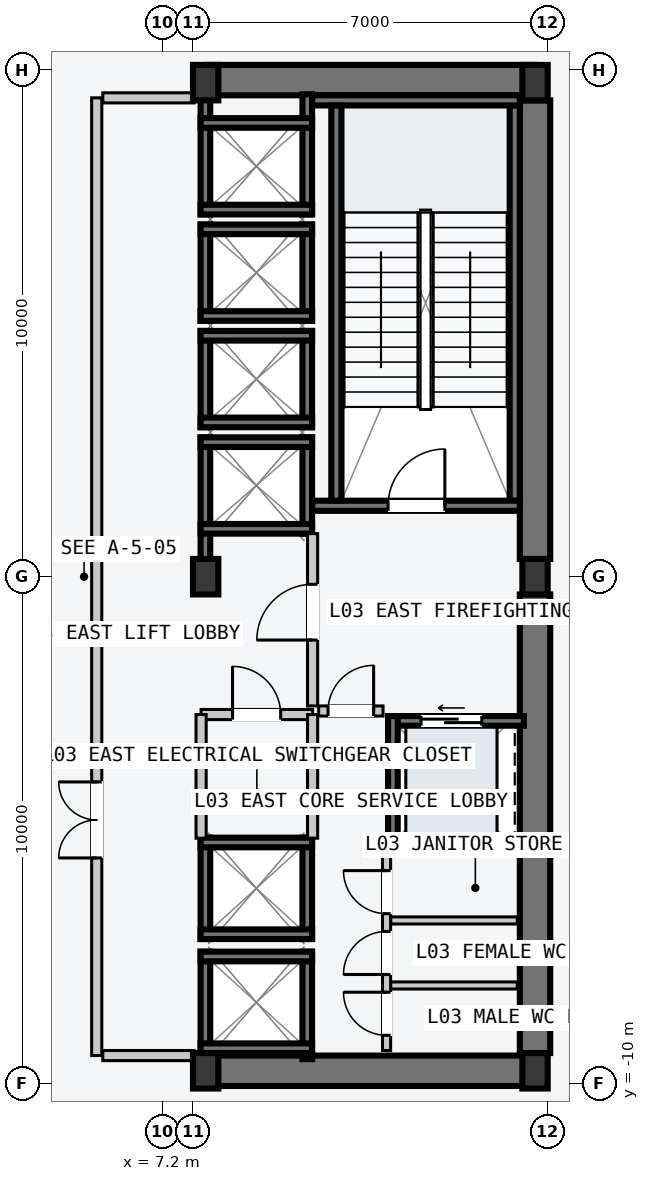
"""IFC4 building model, lengths in metres.
Left out: names, types, materials, properties, quantities, classifications, styles, units other than length and angle.
Written with IfcOpenShell. Run it as: python <this file> out.ifc"""

import sys

from ifc_helpers import new_model, si_unit, direction, frame, frame_2d, origin, origin_2d, place, context, subcontext, project, spatial, rectangle, i_section, extrude, element, fill, save


model = new_model("IFC4")
c1 = context("Model", 3, precision=1e-05, world=origin(), true_north=direction((0.0, 1.0)))
c2 = subcontext(c1, "Body", "Model", "MODEL_VIEW")
j1 = project(units=[si_unit("LENGTHUNIT", "METRE"), si_unit("PLANEANGLEUNIT", "RADIAN")], contexts=[c1])
p1 = place(None, origin())
s1 = spatial("IfcSite", under=j1, at=p1, CompositionType="ELEMENT")
p2 = place(p1, origin())
s2 = spatial("IfcBuilding", under=s1, at=p2, CompositionType="ELEMENT")
p3 = place(p2, frame((0.0, 0.0, 14.4)))
s3 = spatial("IfcBuildingStorey", under=s2, at=p3, CompositionType="ELEMENT", Elevation=14.4)
for number, where, z_axis, x_axis in (
    (1, (8.07, -9.75, -0.22), (0.0, 0.0, 1.0), (1.0, 0.0, 0.0)),
    (2, (8.07, 9.8, -0.22), (0.0, 0.0, 1.0), (1.0, 0.0, 0.0)),
):
    element("IfcWall", number, at=place(p3, frame(where, z_axis=z_axis, x_axis=x_axis)), inside=s3, PredefinedType="SHEAR", context=c2, shape_type="SweptSolid", body=[
        extrude(rectangle(XDim=6.46, YDim=0.6, at=frame_2d((3.23, 0.0))), origin(), (0.0, 0.0, 1.0), 4.8),
    ])
for number, where, z_axis, x_axis in (
    (3, (14.55, -9.4, -0.22), (0.0, 0.0, 1.0), (0.0, 1.0, 0.0)),
    (4, (14.55, 0.35, -0.22), (0.0, 0.0, 1.0), (0.0, 1.0, 0.0)),
):
    element("IfcWall", number, at=place(p3, frame(where, z_axis=z_axis, x_axis=x_axis)), inside=s3, PredefinedType="SHEAR", context=c2, shape_type="SweptSolid", body=[
        extrude(rectangle(XDim=9.05, YDim=0.6, at=frame_2d((4.525, 0.0))), origin(), (0.0, 0.0, 1.0), 4.8),
    ])
p4 = place(p3, frame((14.15, 1.5, -0.22), z_axis=(0.0, 0.0, 1.0), x_axis=(0.0, 1.0, 0.0)))
e5 = element("IfcWall", 5, at=p4, inside=s3, PredefinedType="SOLIDWALL", context=c2, shape_type="SweptSolid", body=[
    extrude(rectangle(XDim=7.8, YDim=0.2, at=frame_2d((3.9, 0.0))), origin(), (0.0, 0.0, 1.0), 4.8),
])
p5 = place(p3, frame((10.15, 1.4, -0.22), z_axis=(0.0, 0.0, 1.0), x_axis=(1.0, 0.0, 0.0)))
e6 = element("IfcWall", 6, at=p5, inside=s3, PredefinedType="SOLIDWALL", context=c2, shape_type="SweptSolid", body=[
    extrude(rectangle(XDim=4.1, YDim=0.2, at=frame_2d((2.05, 0.0))), origin(), (0.0, 0.0, 1.0), 4.8),
])
p6 = place(p5, frame((1.5, 0.0, 0.22)))
e7 = element("IfcOpeningElement", 7, at=p6, cuts=e6, PredefinedType="OPENING", context=c2, shape_type="SweptSolid", body=[
    extrude(rectangle(XDim=1.12, YDim=2.18, at=frame_2d((0.56, 1.09))), frame((0.0, 0.11, 0.0), z_axis=(0.0, -1.0, 0.0), x_axis=(1.0, 0.0, 0.0)), (0.0, 0.0, 1.0), 0.22),
])
p7 = place(p3, frame((10.15, 9.4, -0.22), z_axis=(0.0, 0.0, 1.0), x_axis=(1.0, 0.0, 0.0)))
e8 = element("IfcWall", 8, at=p7, inside=s3, PredefinedType="SOLIDWALL", context=c2, shape_type="SweptSolid", body=[
    extrude(rectangle(XDim=4.1, YDim=0.2, at=frame_2d((2.05, 0.0))), origin(), (0.0, 0.0, 1.0), 4.8),
])
p8 = place(p3, frame((10.63, 1.5, -0.22), z_axis=(0.0, 0.0, 1.0), x_axis=(0.0, 1.0, 0.0)))
e9 = element("IfcWall", 9, at=p8, inside=s3, PredefinedType="SOLIDWALL", context=c2, shape_type="SweptSolid", body=[
    extrude(rectangle(XDim=7.8, YDim=0.2, at=frame_2d((3.9, 0.0))), origin(), (0.0, 0.0, 1.0), 4.8),
])
for number, where, z_axis, x_axis in (
    (10, (8.05, -9.75, 0.0), (0.0, 0.0, 1.0), (1.0, 0.0, 0.0)),
    (11, (8.05, 0.0, 0.0), (0.0, 0.0, 1.0), (1.0, 0.0, 0.0)),
    (12, (8.05, 9.75, 0.0), (0.0, 0.0, 1.0), (1.0, 0.0, 0.0)),
    (13, (14.55, -9.75, 0.0), (0.0, 0.0, 1.0), (1.0, 0.0, 0.0)),
    (14, (14.55, 0.0, 0.0), (0.0, 0.0, 1.0), (1.0, 0.0, 0.0)),
    (15, (14.55, 9.75, 0.0), (0.0, 0.0, 1.0), (1.0, 0.0, 0.0)),
):
    element("IfcColumn", number, at=place(p3, frame(where, z_axis=z_axis, x_axis=x_axis)), inside=s3, PredefinedType="COLUMN", context=c2, shape_type="SweptSolid", body=[
        extrude(i_section(OverallWidth=0.5, OverallDepth=0.7, WebThickness=0.028, FlangeThickness=0.045, at=origin_2d()), origin(), (0.0, 0.0, 1.0), 4.8),
    ])
p9 = place(p3, frame((8.045, 0.21, -0.22), z_axis=(0.0, 0.0, 1.0), x_axis=(0.0, 1.0, 0.0)))
e16 = element("IfcWall", 16, at=p9, inside=s3, PredefinedType="SOLIDWALL", context=c2, shape_type="SweptSolid", body=[
    extrude(rectangle(XDim=2.54, YDim=0.19, at=frame_2d((1.27, 0.0))), origin(), (0.0, 0.0, 1.0), 4.8),
])
p10 = place(p3, frame((10.055, 0.85, -0.22), z_axis=(0.0, 0.0, 1.0), x_axis=(0.0, 1.0, 0.0)))
e17 = element("IfcWall", 17, at=p10, inside=s3, PredefinedType="SOLIDWALL", context=c2, shape_type="SweptSolid", body=[
    extrude(rectangle(XDim=1.9, YDim=0.19, at=frame_2d((0.95, 0.0))), origin(), (0.0, 0.0, 1.0), 4.8),
])
for number, where, z_axis, x_axis in (
    (18, (7.95, 2.655, -0.22), (0.0, 0.0, 1.0), (1.0, 0.0, 0.0)),
    (19, (7.95, 0.945, -0.22), (0.0, 0.0, 1.0), (1.0, 0.0, 0.0)),
):
    element("IfcWall", number, at=place(p3, frame(where, z_axis=z_axis, x_axis=x_axis)), inside=s3, PredefinedType="SOLIDWALL", context=c2, shape_type="SweptSolid", body=[
        extrude(rectangle(XDim=2.2, YDim=0.19, at=frame_2d((1.1, 0.0))), origin(), (0.0, 0.0, 1.0), 4.8),
    ])
for number, where, z_axis, x_axis in (
    (20, (8.045, 2.95, -0.22), (0.0, 0.0, 1.0), (0.0, 1.0, 0.0)),
    (21, (10.055, 2.95, -0.22), (0.0, 0.0, 1.0), (0.0, 1.0, 0.0)),
):
    element("IfcWall", number, at=place(p3, frame(where, z_axis=z_axis, x_axis=x_axis)), inside=s3, PredefinedType="SOLIDWALL", context=c2, shape_type="SweptSolid", body=[
        extrude(rectangle(XDim=1.9, YDim=0.19, at=frame_2d((0.95, 0.0))), origin(), (0.0, 0.0, 1.0), 4.8),
    ])
for number, where, z_axis, x_axis in (
    (22, (7.95, 4.755, -0.22), (0.0, 0.0, 1.0), (1.0, 0.0, 0.0)),
    (23, (7.95, 3.045, -0.22), (0.0, 0.0, 1.0), (1.0, 0.0, 0.0)),
):
    element("IfcWall", number, at=place(p3, frame(where, z_axis=z_axis, x_axis=x_axis)), inside=s3, PredefinedType="SOLIDWALL", context=c2, shape_type="SweptSolid", body=[
        extrude(rectangle(XDim=2.2, YDim=0.19, at=frame_2d((1.1, 0.0))), origin(), (0.0, 0.0, 1.0), 4.8),
    ])
for number, where, z_axis, x_axis in (
    (24, (8.045, 5.05, -0.22), (0.0, 0.0, 1.0), (0.0, 1.0, 0.0)),
    (25, (10.055, 5.05, -0.22), (0.0, 0.0, 1.0), (0.0, 1.0, 0.0)),
):
    element("IfcWall", number, at=place(p3, frame(where, z_axis=z_axis, x_axis=x_axis)), inside=s3, PredefinedType="SOLIDWALL", context=c2, shape_type="SweptSolid", body=[
        extrude(rectangle(XDim=1.9, YDim=0.19, at=frame_2d((0.95, 0.0))), origin(), (0.0, 0.0, 1.0), 4.8),
    ])
for number, where, z_axis, x_axis in (
    (26, (7.95, 6.855, -0.22), (0.0, 0.0, 1.0), (1.0, 0.0, 0.0)),
    (27, (7.95, 5.145, -0.22), (0.0, 0.0, 1.0), (1.0, 0.0, 0.0)),
):
    element("IfcWall", number, at=place(p3, frame(where, z_axis=z_axis, x_axis=x_axis)), inside=s3, PredefinedType="SOLIDWALL", context=c2, shape_type="SweptSolid", body=[
        extrude(rectangle(XDim=2.2, YDim=0.19, at=frame_2d((1.1, 0.0))), origin(), (0.0, 0.0, 1.0), 4.8),
    ])
for number, where, z_axis, x_axis in (
    (28, (8.045, 7.15, -0.22), (0.0, 0.0, 1.0), (0.0, 1.0, 0.0)),
    (29, (10.055, 7.15, -0.22), (0.0, 0.0, 1.0), (0.0, 1.0, 0.0)),
):
    element("IfcWall", number, at=place(p3, frame(where, z_axis=z_axis, x_axis=x_axis)), inside=s3, PredefinedType="SOLIDWALL", context=c2, shape_type="SweptSolid", body=[
        extrude(rectangle(XDim=2.37, YDim=0.19, at=frame_2d((1.185, 0.0))), origin(), (0.0, 0.0, 1.0), 4.8),
    ])
for number, where, z_axis, x_axis in (
    (30, (7.95, 8.955, -0.22), (0.0, 0.0, 1.0), (1.0, 0.0, 0.0)),
    (31, (7.95, 7.245, -0.22), (0.0, 0.0, 1.0), (1.0, 0.0, 0.0)),
):
    element("IfcWall", number, at=place(p3, frame(where, z_axis=z_axis, x_axis=x_axis)), inside=s3, PredefinedType="SOLIDWALL", context=c2, shape_type="SweptSolid", body=[
        extrude(rectangle(XDim=2.2, YDim=0.19, at=frame_2d((1.1, 0.0))), origin(), (0.0, 0.0, 1.0), 4.8),
    ])
for number, where, z_axis, x_axis in (
    (32, (8.045, -9.52, -0.22), (0.0, 0.0, 1.0), (0.0, 1.0, 0.0)),
    (33, (10.055, -9.52, -0.22), (0.0, 0.0, 1.0), (0.0, 1.0, 0.0)),
):
    element("IfcWall", number, at=place(p3, frame(where, z_axis=z_axis, x_axis=x_axis)), inside=s3, PredefinedType="SOLIDWALL", context=c2, shape_type="SweptSolid", body=[
        extrude(rectangle(XDim=2.12, YDim=0.19, at=frame_2d((1.06, 0.0))), origin(), (0.0, 0.0, 1.0), 4.8),
    ])
for number, where, z_axis, x_axis in (
    (34, (7.95, -7.495, -0.22), (0.0, 0.0, 1.0), (1.0, 0.0, 0.0)),
    (35, (7.95, -9.305, -0.22), (0.0, 0.0, 1.0), (1.0, 0.0, 0.0)),
):
    element("IfcWall", number, at=place(p3, frame(where, z_axis=z_axis, x_axis=x_axis)), inside=s3, PredefinedType="SOLIDWALL", context=c2, shape_type="SweptSolid", body=[
        extrude(rectangle(XDim=2.2, YDim=0.19, at=frame_2d((1.1, 0.0))), origin(), (0.0, 0.0, 1.0), 4.8),
    ])
for number, where, z_axis, x_axis in (
    (36, (8.045, -7.15, -0.22), (0.0, 0.0, 1.0), (0.0, 1.0, 0.0)),
    (37, (10.055, -7.15, -0.22), (0.0, 0.0, 1.0), (0.0, 1.0, 0.0)),
):
    element("IfcWall", number, at=place(p3, frame(where, z_axis=z_axis, x_axis=x_axis)), inside=s3, PredefinedType="SOLIDWALL", context=c2, shape_type="SweptSolid", body=[
        extrude(rectangle(XDim=2.0, YDim=0.19, at=frame_2d((1.0, 0.0))), origin(), (0.0, 0.0, 1.0), 4.8),
    ])
for number, where, z_axis, x_axis in (
    (38, (7.95, -5.245, -0.22), (0.0, 0.0, 1.0), (1.0, 0.0, 0.0)),
    (39, (7.95, -7.055, -0.22), (0.0, 0.0, 1.0), (1.0, 0.0, 0.0)),
):
    element("IfcWall", number, at=place(p3, frame(where, z_axis=z_axis, x_axis=x_axis)), inside=s3, PredefinedType="SOLIDWALL", context=c2, shape_type="SweptSolid", body=[
        extrude(rectangle(XDim=2.2, YDim=0.19, at=frame_2d((1.1, 0.0))), origin(), (0.0, 0.0, 1.0), 4.8),
    ])
p11 = place(p3, frame((11.65, -2.845, -0.22), z_axis=(0.0, 0.0, 1.0), x_axis=(1.0, 0.0, 0.0)))
e40 = element("IfcWall", 40, at=p11, inside=s3, PredefinedType="SOLIDWALL", context=c2, shape_type="SweptSolid", body=[
    extrude(rectangle(XDim=2.68, YDim=0.19, at=frame_2d((1.34, 0.0))), origin(), (0.0, 0.0, 1.0), 4.8),
])
p12 = place(p11, frame((0.65, 0.0, 0.22)))
e41 = element("IfcOpeningElement", 41, at=p12, cuts=e40, PredefinedType="OPENING", context=c2, shape_type="SweptSolid", body=[
    extrude(rectangle(XDim=1.2, YDim=2.2, at=frame_2d((0.6, 1.1))), frame((0.0, 0.105, 0.0), z_axis=(0.0, -1.0, 0.0), x_axis=(1.0, 0.0, 0.0)), (0.0, 0.0, 1.0), 0.21),
])
p13 = place(p3, frame((11.65, -5.255, -0.22), z_axis=(0.0, 0.0, 1.0), x_axis=(1.0, 0.0, 0.0)))
e42 = element("IfcWall", 42, at=p13, inside=s3, PredefinedType="SOLIDWALL", context=c2, shape_type="SweptSolid", body=[
    extrude(rectangle(XDim=2.68, YDim=0.19, at=frame_2d((1.34, 0.0))), origin(), (0.0, 0.0, 1.0), 4.8),
])
p14 = place(p3, frame((11.745, -5.35, -0.22), z_axis=(0.0, 0.0, 1.0), x_axis=(0.0, 1.0, 0.0)))
e43 = element("IfcWall", 43, at=p14, inside=s3, PredefinedType="SOLIDWALL", context=c2, shape_type="SweptSolid", body=[
    extrude(rectangle(XDim=2.6, YDim=0.19, at=frame_2d((1.3, 0.0))), origin(), (0.0, 0.0, 1.0), 4.8),
])
p15 = place(p3, frame((5.9, -9.45, 0.0), z_axis=(0.0, 0.0, 1.0), x_axis=(0.0, 1.0, 0.0)))
e44 = element("IfcWall", 44, at=p15, inside=s3, PredefinedType="PARTITIONING", context=c2, shape_type="SweptSolid", body=[
    extrude(rectangle(XDim=18.9, YDim=0.2, at=frame_2d((9.45, 0.0))), origin(), (0.0, 0.0, 1.0), 4.58),
])
p16 = place(p15, frame((3.9, 0.0, 0.0)))
e45 = element("IfcOpeningElement", 45, at=p16, cuts=e44, PredefinedType="OPENING", context=c2, shape_type="SweptSolid", body=[
    extrude(rectangle(XDim=1.5, YDim=2.2, at=frame_2d((0.75, 1.1))), frame((0.0, 0.11, 0.0), z_axis=(0.0, -1.0, 0.0), x_axis=(1.0, 0.0, 0.0)), (0.0, 0.0, 1.0), 0.22),
])
for number, where, z_axis, x_axis in (
    (46, (6.02, -9.45, 0.0), (0.0, 0.0, 1.0), (1.0, 0.0, 0.0)),
    (47, (6.02, 9.45, 0.0), (0.0, 0.0, 1.0), (1.0, 0.0, 0.0)),
):
    element("IfcWall", number, at=place(p3, frame(where, z_axis=z_axis, x_axis=x_axis)), inside=s3, PredefinedType="PARTITIONING", context=c2, shape_type="SweptSolid", body=[
        extrude(rectangle(XDim=1.8, YDim=0.2, at=frame_2d((0.9, 0.0))), origin(), (0.0, 0.0, 1.0), 2.63),
    ])
p17 = place(p3, frame((10.16, -2.55, 0.0), z_axis=(0.0, 0.0, 1.0), x_axis=(0.0, 1.0, 0.0)))
e48 = element("IfcWall", 48, at=p17, inside=s3, PredefinedType="PARTITIONING", context=c2, shape_type="SweptSolid", body=[
    extrude(rectangle(XDim=3.4, YDim=0.2, at=frame_2d((1.7, 0.0))), origin(), (0.0, 0.0, 1.0), 4.58),
])
p18 = place(p17, frame((1.3, 0.0, 0.0)))
e49 = element("IfcOpeningElement", 49, at=p18, cuts=e48, PredefinedType="OPENING", context=c2, shape_type="SweptSolid", body=[
    extrude(rectangle(XDim=1.1, YDim=2.15, at=frame_2d((0.55, 1.075))), frame((0.0, 0.11, 0.0), z_axis=(0.0, -1.0, 0.0), x_axis=(1.0, 0.0, 0.0)), (0.0, 0.0, 1.0), 0.22),
])
p19 = place(p3, frame((10.28, -2.65, 0.0), z_axis=(0.0, 0.0, 1.0), x_axis=(1.0, 0.0, 0.0)))
e50 = element("IfcWall", 50, at=p19, inside=s3, PredefinedType="PARTITIONING", context=c2, shape_type="SweptSolid", body=[
    extrude(rectangle(XDim=1.27, YDim=0.2, at=frame_2d((0.635, 0.0))), origin(), (0.0, 0.0, 1.0), 4.58),
])
p20 = place(p19, frame((0.185, 0.0, 0.0)))
e51 = element("IfcOpeningElement", 51, at=p20, cuts=e50, PredefinedType="OPENING", context=c2, shape_type="SweptSolid", body=[
    extrude(rectangle(XDim=0.9, YDim=2.15, at=frame_2d((0.45, 1.075))), frame((0.0, 0.11, 0.0), z_axis=(0.0, -1.0, 0.0), x_axis=(1.0, 0.0, 0.0)), (0.0, 0.0, 1.0), 0.22),
])
p21 = place(p3, frame((7.96, -2.72, 0.0), z_axis=(0.0, 0.0, 1.0), x_axis=(1.0, 0.0, 0.0)))
e52 = element("IfcWall", 52, at=p21, inside=s3, PredefinedType="PARTITIONING", context=c2, shape_type="SweptSolid", body=[
    extrude(rectangle(XDim=2.2, YDim=0.2, at=frame_2d((1.1, 0.0))), origin(), (0.0, 0.0, 1.0), 4.58),
])
p22 = place(p21, frame((0.62, 0.0, 0.0)))
e53 = element("IfcOpeningElement", 53, at=p22, cuts=e52, PredefinedType="OPENING", context=c2, shape_type="SweptSolid", body=[
    extrude(rectangle(XDim=0.95, YDim=2.1, at=frame_2d((0.475, 1.05))), frame((0.0, 0.11, 0.0), z_axis=(0.0, -1.0, 0.0), x_axis=(1.0, 0.0, 0.0)), (0.0, 0.0, 1.0), 0.22),
])
for number, where, z_axis, x_axis in (
    (54, (7.96, -5.16, 0.0), (0.0, 0.0, 1.0), (0.0, 1.0, 0.0)),
    (55, (10.16, -5.16, 0.0), (0.0, 0.0, 1.0), (0.0, 1.0, 0.0)),
):
    element("IfcWall", number, at=place(p3, frame(where, z_axis=z_axis, x_axis=x_axis)), inside=s3, PredefinedType="PARTITIONING", context=c2, shape_type="SweptSolid", body=[
        extrude(rectangle(XDim=2.44, YDim=0.2, at=frame_2d((1.22, 0.0))), origin(), (0.0, 0.0, 1.0), 4.58),
    ])
for number, where, z_axis, x_axis in (
    (56, (11.7, -8.067, 0.0), (0.0, 0.0, 1.0), (1.0, 0.0, 0.0)),
    (57, (11.7, -6.783, 0.0), (0.0, 0.0, 1.0), (1.0, 0.0, 0.0)),
):
    element("IfcWall", number, at=place(p3, frame(where, z_axis=z_axis, x_axis=x_axis)), inside=s3, PredefinedType="PARTITIONING", context=c2, shape_type="SweptSolid", body=[
        extrude(rectangle(XDim=2.5, YDim=0.14, at=frame_2d((1.25, 0.0))), origin(), (0.0, 0.0, 1.0), 4.58),
    ])
p23 = place(p3, frame((11.62, -9.35, 0.0), z_axis=(0.0, 0.0, 1.0), x_axis=(0.0, 1.0, 0.0)))
e58 = element("IfcWall", 58, at=p23, inside=s3, PredefinedType="PARTITIONING", context=c2, shape_type="SweptSolid", body=[
    extrude(rectangle(XDim=3.85, YDim=0.16, at=frame_2d((1.925, 0.0))), origin(), (0.0, 0.0, 1.0), 4.58),
])
p24 = place(p23, frame((0.3, 0.0, 0.0)))
e59 = element("IfcOpeningElement", 59, at=p24, cuts=e58, PredefinedType="OPENING", context=c2, shape_type="SweptSolid", body=[
    extrude(rectangle(XDim=0.85, YDim=2.12, at=frame_2d((0.425, 1.06))), frame((0.0, 0.09, 0.0), z_axis=(0.0, -1.0, 0.0), x_axis=(1.0, 0.0, 0.0)), (0.0, 0.0, 1.0), 0.18),
])
p25 = place(p23, frame((1.5, 0.0, 0.0)))
e60 = element("IfcOpeningElement", 60, at=p25, cuts=e58, PredefinedType="OPENING", context=c2, shape_type="SweptSolid", body=[
    extrude(rectangle(XDim=0.85, YDim=2.12, at=frame_2d((0.425, 1.06))), frame((0.0, 0.09, 0.0), z_axis=(0.0, -1.0, 0.0), x_axis=(1.0, 0.0, 0.0)), (0.0, 0.0, 1.0), 0.18),
])
p26 = place(p23, frame((2.7, 0.0, 0.0)))
e61 = element("IfcOpeningElement", 61, at=p26, cuts=e58, PredefinedType="OPENING", context=c2, shape_type="SweptSolid", body=[
    extrude(rectangle(XDim=0.85, YDim=2.12, at=frame_2d((0.425, 1.06))), frame((0.0, 0.09, 0.0), z_axis=(0.0, -1.0, 0.0), x_axis=(1.0, 0.0, 0.0)), (0.0, 0.0, 1.0), 0.18),
])
p27 = place(p6, origin())
e62 = element("IfcDoor", 62, at=p27, inside=s3, OperationType="SINGLE_SWING_RIGHT", PredefinedType="DOOR", context=c2, shape_type="SweptSolid", body=[
    extrude(rectangle(XDim=1.12, YDim=2.18, at=frame_2d((0.56, 1.09))), frame((0.0, 0.025, 0.0), z_axis=(0.0, -1.0, 0.0), x_axis=(1.0, 0.0, 0.0)), (0.0, 0.0, 1.0), 0.05),
])
fill(e7, e62)
p28 = place(p12, origin())
e63 = element("IfcDoor", 63, at=p28, inside=s3, OperationType="SLIDING_TO_LEFT", PredefinedType="DOOR", context=c2, shape_type="SweptSolid", body=[
    extrude(rectangle(XDim=1.2, YDim=2.2, at=frame_2d((0.6, 1.1))), frame((0.0, 0.025, 0.0), z_axis=(0.0, -1.0, 0.0), x_axis=(1.0, 0.0, 0.0)), (0.0, 0.0, 1.0), 0.05),
])
fill(e41, e63)
p29 = place(p16, origin())
e64 = element("IfcDoor", 64, at=p29, inside=s3, OperationType="DOUBLE_DOOR_SINGLE_SWING", PredefinedType="DOOR", context=c2, shape_type="SweptSolid", body=[
    extrude(rectangle(XDim=1.5, YDim=2.2, at=frame_2d((0.75, 1.1))), frame((0.0, 0.025, 0.0), z_axis=(0.0, -1.0, 0.0), x_axis=(1.0, 0.0, 0.0)), (0.0, 0.0, 1.0), 0.05),
])
fill(e45, e64)
p30 = place(p18, origin())
e65 = element("IfcDoor", 65, at=p30, inside=s3, OperationType="SINGLE_SWING_LEFT", PredefinedType="DOOR", context=c2, shape_type="SweptSolid", body=[
    extrude(rectangle(XDim=1.1, YDim=2.15, at=frame_2d((0.55, 1.075))), frame((0.0, 0.025, 0.0), z_axis=(0.0, -1.0, 0.0), x_axis=(1.0, 0.0, 0.0)), (0.0, 0.0, 1.0), 0.05),
])
fill(e49, e65)
p31 = place(p20, origin())
e66 = element("IfcDoor", 66, at=p31, inside=s3, OperationType="SINGLE_SWING_RIGHT", PredefinedType="DOOR", context=c2, shape_type="SweptSolid", body=[
    extrude(rectangle(XDim=0.9, YDim=2.15, at=frame_2d((0.45, 1.075))), frame((0.0, 0.025, 0.0), z_axis=(0.0, -1.0, 0.0), x_axis=(1.0, 0.0, 0.0)), (0.0, 0.0, 1.0), 0.05),
])
fill(e51, e66)
p32 = place(p22, origin())
e67 = element("IfcDoor", 67, at=p32, inside=s3, OperationType="SINGLE_SWING_LEFT", PredefinedType="DOOR", context=c2, shape_type="SweptSolid", body=[
    extrude(rectangle(XDim=0.95, YDim=2.1, at=frame_2d((0.475, 1.05))), frame((0.0, 0.025, 0.0), z_axis=(0.0, -1.0, 0.0), x_axis=(1.0, 0.0, 0.0)), (0.0, 0.0, 1.0), 0.05),
])
fill(e53, e67)
p33 = place(p24, origin())
e68 = element("IfcDoor", 68, at=p33, inside=s3, OperationType="SINGLE_SWING_RIGHT", PredefinedType="DOOR", context=c2, shape_type="SweptSolid", body=[
    extrude(rectangle(XDim=0.85, YDim=2.12, at=frame_2d((0.425, 1.06))), frame((0.0, 0.025, 0.0), z_axis=(0.0, -1.0, 0.0), x_axis=(1.0, 0.0, 0.0)), (0.0, 0.0, 1.0), 0.05),
])
fill(e59, e68)
p34 = place(p25, origin())
e69 = element("IfcDoor", 69, at=p34, inside=s3, OperationType="SINGLE_SWING_LEFT", PredefinedType="DOOR", context=c2, shape_type="SweptSolid", body=[
    extrude(rectangle(XDim=0.85, YDim=2.12, at=frame_2d((0.425, 1.06))), frame((0.0, 0.025, 0.0), z_axis=(0.0, -1.0, 0.0), x_axis=(1.0, 0.0, 0.0)), (0.0, 0.0, 1.0), 0.05),
])
fill(e60, e69)
p35 = place(p26, origin())
e70 = element("IfcDoor", 70, at=p35, inside=s3, OperationType="SINGLE_SWING_RIGHT", PredefinedType="DOOR", context=c2, shape_type="SweptSolid", body=[
    extrude(rectangle(XDim=0.85, YDim=2.12, at=frame_2d((0.425, 1.06))), frame((0.0, 0.025, 0.0), z_axis=(0.0, -1.0, 0.0), x_axis=(1.0, 0.0, 0.0)), (0.0, 0.0, 1.0), 0.05),
])
fill(e61, e70)
save(model, sys.argv[1])
